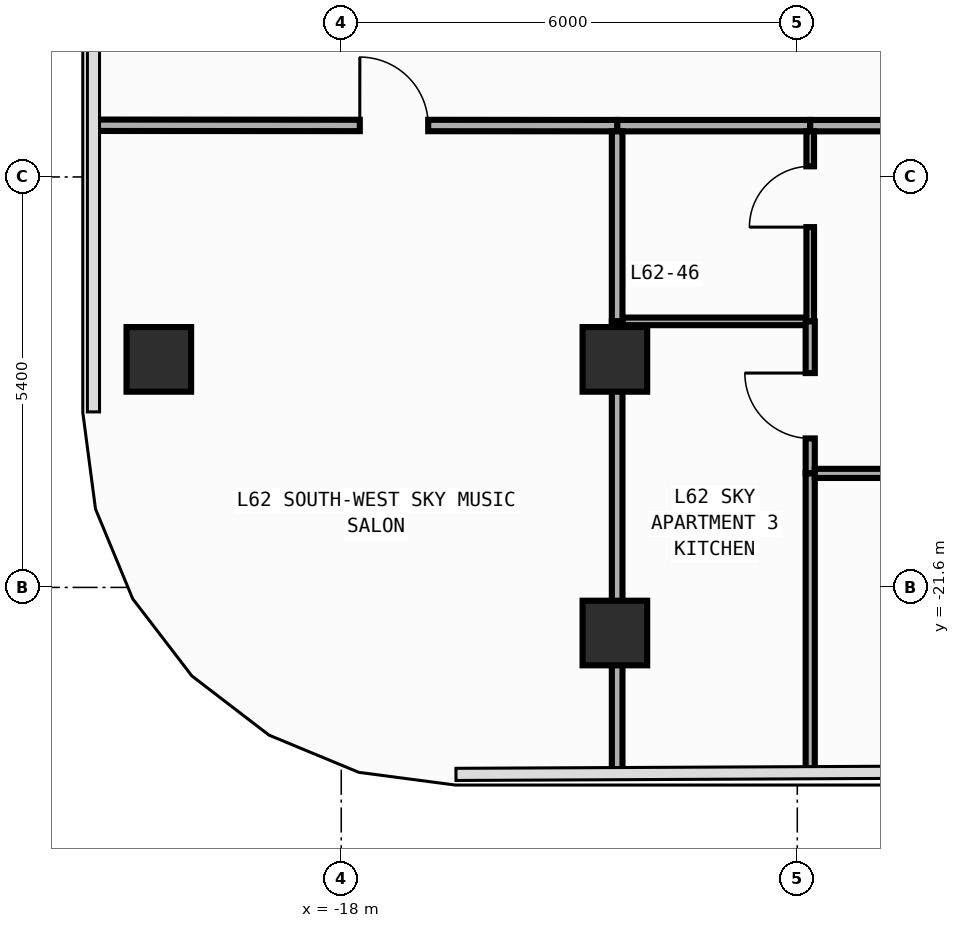
"""IFC4 building model, lengths in metres.
Left out: names, types, materials, properties, quantities, classifications, styles, units other than length and angle.
Written with IfcOpenShell. Run it as: python <this file> out.ifc"""

import sys

from ifc_helpers import new_model, si_unit, direction, frame, frame_2d, origin, origin_2d, place, context, subcontext, project, spatial, rectangle, extrude, element, fill, save


model = new_model("IFC4")
c1 = context("Model", 3, precision=1e-05, world=origin(), true_north=direction((0.0, 1.0)))
c2 = subcontext(c1, "Body", "Model", "MODEL_VIEW")
j1 = project(units=[si_unit("LENGTHUNIT", "METRE"), si_unit("PLANEANGLEUNIT", "RADIAN")], contexts=[c1])
p1 = place(None, origin())
s1 = spatial("IfcSite", under=j1, at=p1, CompositionType="ELEMENT")
p2 = place(p1, origin())
s2 = spatial("IfcBuilding", under=s1, at=p2, CompositionType="ELEMENT")
p3 = place(p2, frame((0.0, 0.0, 262.0)))
s3 = spatial("IfcBuildingStorey", under=s2, at=p3, CompositionType="ELEMENT", Elevation=262.0)
for number, where, z_axis, x_axis in (
    (1, (-20.4, -18.6, 0.0), (0.0, 0.0, 1.0), (1.0, 0.0, 0.0)),
    (2, (-14.4, -18.6, 0.0), (0.0, 0.0, 1.0), (1.0, 0.0, 0.0)),
    (3, (-14.4, -22.2, 0.0), (0.0, 0.0, 1.0), (1.0, 0.0, 0.0)),
):
    element("IfcColumn", number, at=place(p3, frame(where, z_axis=z_axis, x_axis=x_axis)), inside=s3, PredefinedType="COLUMN", context=c2, shape_type="SweptSolid", body=[
        extrude(rectangle(XDim=0.85, YDim=0.85, at=origin_2d()), origin(), (0.0, 0.0, 1.0), 3.6),
    ])
p4 = place(p3, frame((-14.37, -15.525, 0.0), z_axis=(0.0, 0.0, 1.0), x_axis=(1.0, 0.0, 0.0)))
e4 = element("IfcWall", 4, at=p4, inside=s3, PredefinedType="PARTITIONING", context=c2, shape_type="SweptSolid", body=[
    extrude(rectangle(XDim=2.54, YDim=0.15, at=frame_2d((1.27, 0.0))), origin(), (0.0, 0.0, 1.0), 3.34),
])
p5 = place(p3, frame((-11.83, -15.525, 0.0), z_axis=(0.0, 0.0, 1.0), x_axis=(1.0, 0.0, 0.0)))
e5 = element("IfcWall", 5, at=p5, inside=s3, PredefinedType="PARTITIONING", context=c2, shape_type="SweptSolid", body=[
    extrude(rectangle(XDim=12.13, YDim=0.15, at=frame_2d((6.065, 0.0))), origin(), (0.0, 0.0, 1.0), 3.34),
])
p6 = place(p5, frame((4.301, 0.0, 0.0)))
e6 = element("IfcOpeningElement", 6, at=p6, cuts=e5, PredefinedType="OPENING", context=c2, shape_type="SweptSolid", body=[
    extrude(rectangle(XDim=0.9, YDim=2.15, at=frame_2d((0.45, 1.075))), frame((0.0, 0.085, 0.0), z_axis=(0.0, -1.0, 0.0), x_axis=(1.0, 0.0, 0.0)), (0.0, 0.0, 1.0), 0.17),
])
p7 = place(p3, frame((-21.255, -15.52, 0.0), z_axis=(0.0, 0.0, 1.0), x_axis=(0.999999748504, -0.00070921968, 0.0)))
e7 = element("IfcWall", 7, at=p7, inside=s3, PredefinedType="PARTITIONING", context=c2, shape_type="SweptSolid", body=[
    extrude(rectangle(XDim=6.885, YDim=0.15, at=frame_2d((3.442, 0.0))), origin(), (0.0, 0.0, 1.0), 3.34),
])
p8 = place(p7, frame((3.499, 0.0, 0.0)))
e8 = element("IfcOpeningElement", 8, at=p8, cuts=e7, PredefinedType="OPENING", context=c2, shape_type="SweptSolid", body=[
    extrude(rectangle(XDim=0.9, YDim=2.15, at=frame_2d((0.45, 1.075))), frame((0.0, 0.085, 0.0), z_axis=(0.0, -1.0, 0.0), x_axis=(1.0, 0.0, 0.0)), (0.0, 0.0, 1.0), 0.17),
])
p9 = place(p3, frame((-14.3, -18.1, 0.0), z_axis=(0.0, 0.0, 1.0), x_axis=(1.0, 0.0, 0.0)))
e9 = element("IfcWall", 9, at=p9, inside=s3, PredefinedType="PARTITIONING", context=c2, shape_type="SweptSolid", body=[
    extrude(rectangle(XDim=2.42, YDim=0.1, at=frame_2d((1.21, 0.0))), origin(), (0.0, 0.0, 1.0), 3.34),
])
p10 = place(p3, frame((-11.83, -18.1, 0.0), z_axis=(0.0, 0.0, 1.0), x_axis=(0.0, 1.0, 0.0)))
e10 = element("IfcWall", 10, at=p10, inside=s3, PredefinedType="PARTITIONING", context=c2, shape_type="SweptSolid", body=[
    extrude(rectangle(XDim=2.5, YDim=0.1, at=frame_2d((1.25, 0.0))), origin(), (0.0, 0.0, 1.0), 3.34),
])
p11 = place(p10, frame((1.24, 0.0, 0.0)))
e11 = element("IfcOpeningElement", 11, at=p11, cuts=e10, PredefinedType="OPENING", context=c2, shape_type="SweptSolid", body=[
    extrude(rectangle(XDim=0.8, YDim=2.1, at=frame_2d((0.4, 1.05))), frame((0.0, 0.06, 0.0), z_axis=(0.0, -1.0, 0.0), x_axis=(1.0, 0.0, 0.0)), (0.0, 0.0, 1.0), 0.12),
])
p12 = place(p3, frame((-14.37, -18.1, 0.0), z_axis=(0.0, 0.0, 1.0), x_axis=(0.0, 1.0, 0.0)))
e12 = element("IfcWall", 12, at=p12, inside=s3, PredefinedType="PARTITIONING", context=c2, shape_type="SweptSolid", body=[
    extrude(rectangle(XDim=2.5, YDim=0.14, at=frame_2d((1.25, 0.0))), origin(), (0.0, 0.0, 1.0), 2.44),
])
p13 = place(p3, frame((-11.83, -20.1, 0.0), z_axis=(0.0, 0.0, 1.0), x_axis=(0.0, 1.0, 0.0)))
e13 = element("IfcWall", 13, at=p13, inside=s3, PredefinedType="PARTITIONING", context=c2, shape_type="SweptSolid", body=[
    extrude(rectangle(XDim=2.0, YDim=0.12, at=frame_2d((1.0, 0.0))), origin(), (0.0, 0.0, 1.0), 3.34),
])
p14 = place(p13, frame((0.46, 0.0, 0.0)))
e14 = element("IfcOpeningElement", 14, at=p14, cuts=e13, PredefinedType="OPENING", context=c2, shape_type="SweptSolid", body=[
    extrude(rectangle(XDim=0.86, YDim=2.15, at=frame_2d((0.43, 1.075))), frame((0.0, 0.07, 0.0), z_axis=(0.0, -1.0, 0.0), x_axis=(1.0, 0.0, 0.0)), (0.0, 0.0, 1.0), 0.14),
])
p15 = place(p3, frame((-11.83, -24.033, 0.0), z_axis=(0.0, 0.0, 1.0), x_axis=(0.0, 1.0, 0.0)))
e15 = element("IfcWall", 15, at=p15, inside=s3, PredefinedType="PARTITIONING", context=c2, shape_type="SweptSolid", body=[
    extrude(rectangle(XDim=3.933, YDim=0.12, at=frame_2d((1.966, 0.0))), origin(), (0.0, 0.0, 1.0), 3.34),
])
p16 = place(p3, frame((-14.37, -24.045, 0.0), z_axis=(0.0, 0.0, 1.0), x_axis=(0.0, 1.0, 0.0)))
e16 = element("IfcWall", 16, at=p16, inside=s3, PredefinedType="PARTITIONING", context=c2, shape_type="SweptSolid", body=[
    extrude(rectangle(XDim=5.945, YDim=0.14, at=frame_2d((2.972, 0.0))), origin(), (0.0, 0.0, 1.0), 2.44),
])
p17 = place(p3, frame((-11.77, -20.1, 0.0), z_axis=(0.0, 0.0, 1.0), x_axis=(1.0, 0.0, 0.0)))
e17 = element("IfcWall", 17, at=p17, inside=s3, PredefinedType="PARTITIONING", context=c2, shape_type="SweptSolid", body=[
    extrude(rectangle(XDim=5.965, YDim=0.12, at=frame_2d((2.982, 0.0))), origin(), (0.0, 0.0, 1.0), 3.34),
])
p18 = place(p17, frame((4.436, 0.0, 0.0)))
e18 = element("IfcOpeningElement", 18, at=p18, cuts=e17, PredefinedType="OPENING", context=c2, shape_type="SweptSolid", body=[
    extrude(rectangle(XDim=0.86, YDim=2.15, at=frame_2d((0.43, 1.075))), frame((0.0, 0.07, 0.0), z_axis=(0.0, -1.0, 0.0), x_axis=(1.0, 0.0, 0.0)), (0.0, 0.0, 1.0), 0.14),
])
p19 = place(p8, origin())
e19 = element("IfcDoor", 19, at=p19, inside=s3, OperationType="SINGLE_SWING_LEFT", PredefinedType="DOOR", context=c2, shape_type="SweptSolid", body=[
    extrude(rectangle(XDim=0.9, YDim=2.15, at=frame_2d((0.45, 1.075))), frame((0.0, 0.025, 0.0), z_axis=(0.0, -1.0, 0.0), x_axis=(1.0, 0.0, 0.0)), (0.0, 0.0, 1.0), 0.05),
])
fill(e8, e19)
p20 = place(p11, origin())
e20 = element("IfcDoor", 20, at=p20, inside=s3, OperationType="SINGLE_SWING_LEFT", PredefinedType="DOOR", context=c2, shape_type="SweptSolid", body=[
    extrude(rectangle(XDim=0.8, YDim=2.1, at=frame_2d((0.4, 1.05))), frame((0.0, 0.025, 0.0), z_axis=(0.0, -1.0, 0.0), x_axis=(1.0, 0.0, 0.0)), (0.0, 0.0, 1.0), 0.05),
])
fill(e11, e20)
p21 = place(p14, origin())
e21 = element("IfcDoor", 21, at=p21, inside=s3, OperationType="SINGLE_SWING_RIGHT", PredefinedType="DOOR", context=c2, shape_type="SweptSolid", body=[
    extrude(rectangle(XDim=0.86, YDim=2.15, at=frame_2d((0.43, 1.075))), frame((0.0, 0.025, 0.0), z_axis=(0.0, -1.0, 0.0), x_axis=(1.0, 0.0, 0.0)), (0.0, 0.0, 1.0), 0.05),
])
fill(e14, e21)
save(model, sys.argv[1])
